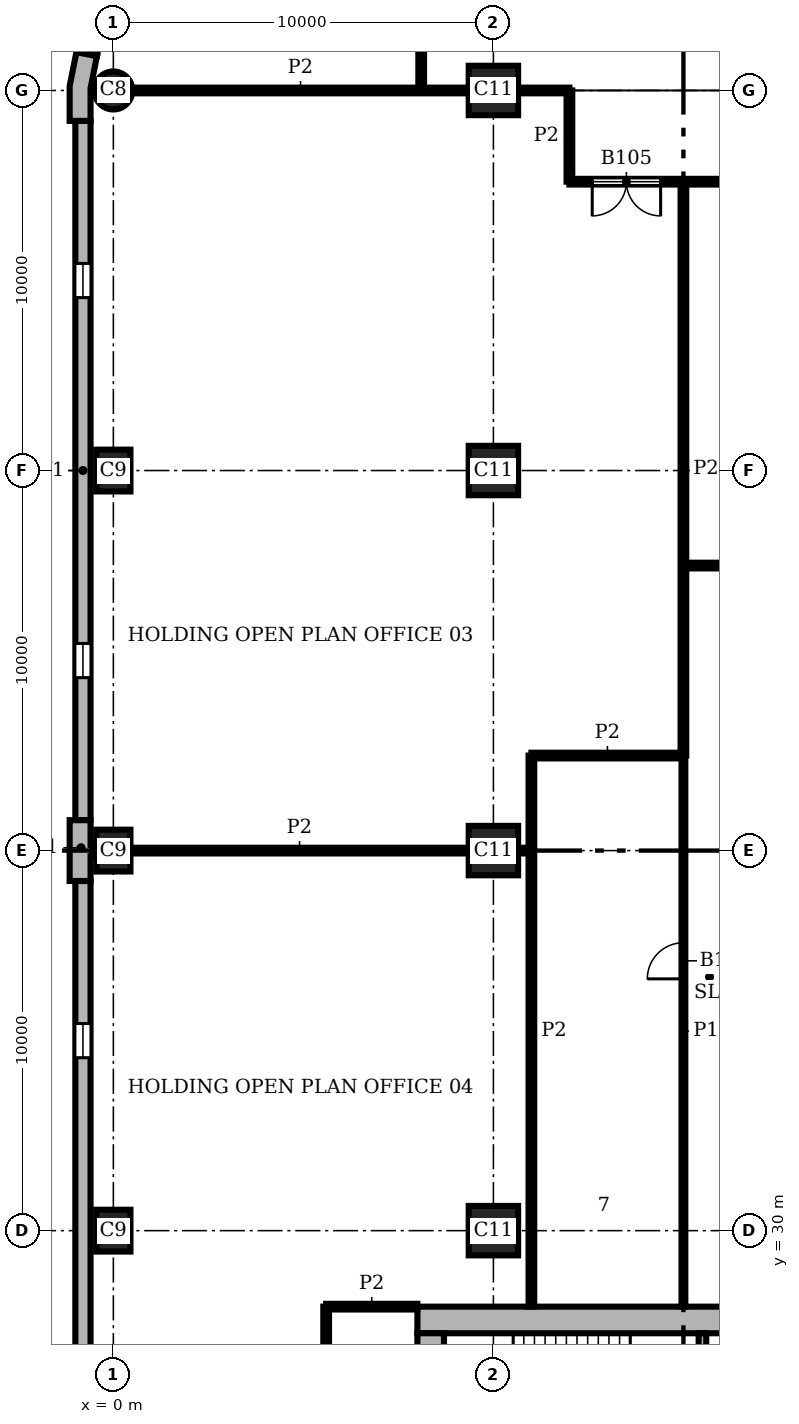
"""IFC4 building model, lengths in metres.
Left out: names, types, materials, properties, quantities, classifications, styles, units other than length and angle.
Written with IfcOpenShell. Run it as: python <this file> out.ifc"""

import sys

from ifc_helpers import new_model, si_unit, direction, frame, frame_2d, origin, origin_2d, place, context, subcontext, project, spatial, polyline, rectangle, circle, outline, extrude, element, fill, save


model = new_model("IFC4")
c1 = context("Model", 3, precision=1e-05, world=origin(), true_north=direction((0.0, 1.0)))
c2 = subcontext(c1, "Body", "Model", "MODEL_VIEW")
j1 = project(units=[si_unit("LENGTHUNIT", "METRE"), si_unit("PLANEANGLEUNIT", "RADIAN")], contexts=[c1])
p1 = place(None, origin())
s1 = spatial("IfcSite", under=j1, at=p1, CompositionType="ELEMENT")
p2 = place(p1, origin())
s2 = spatial("IfcBuilding", under=s1, at=p2, CompositionType="ELEMENT")
p3 = place(p2, frame((0.0, 0.0, 131.7)))
s3 = spatial("IfcBuildingStorey", under=s2, at=p3, CompositionType="ELEMENT", Elevation=131.7)
p4 = place(p3, frame((0.0, 60.0, 0.0), z_axis=(0.0, 0.0, 1.0), x_axis=(1.0, 0.0, 0.0)))
e1 = element("IfcColumn", 1, at=p4, inside=s3, PredefinedType="COLUMN", context=c2, shape_type="SweptSolid", body=[
    extrude(circle(Radius=0.5, at=origin_2d()), origin(), (0.0, 0.0, 1.0), 3.9),
])
for number, where, z_axis, x_axis in (
    (2, (0.0, 50.0, 0.0), (0.0, 0.0, 1.0), (0.0, 1.0, 0.0)),
    (3, (0.0, 40.0, 0.0), (0.0, 0.0, 1.0), (0.0, 1.0, 0.0)),
    (4, (0.0, 30.0, 0.0), (0.0, 0.0, 1.0), (0.0, 1.0, 0.0)),
):
    element("IfcColumn", number, at=place(p3, frame(where, z_axis=z_axis, x_axis=x_axis)), inside=s3, PredefinedType="COLUMN", context=c2, shape_type="SweptSolid", body=[
        extrude(rectangle(XDim=1.1, YDim=0.9, at=origin_2d()), origin(), (0.0, 0.0, 1.0), 3.9),
    ])
for number, where, z_axis, x_axis in (
    (5, (10.0, 30.0, 0.0), (0.0, 0.0, 1.0), (1.0, 0.0, 0.0)),
    (6, (10.0, 40.0, 0.0), (0.0, 0.0, 1.0), (1.0, 0.0, 0.0)),
    (7, (10.0, 50.0, 0.0), (0.0, 0.0, 1.0), (1.0, 0.0, 0.0)),
    (8, (10.0, 60.0, 0.0), (0.0, 0.0, 1.0), (1.0, 0.0, 0.0)),
):
    element("IfcColumn", number, at=place(p3, frame(where, z_axis=z_axis, x_axis=x_axis)), inside=s3, PredefinedType="COLUMN", context=c2, shape_type="SweptSolid", body=[
        extrude(rectangle(XDim=1.3, YDim=1.3, at=origin_2d()), origin(), (0.0, 0.0, 1.0), 3.9),
    ])
p5 = place(p3, frame((28.0, 27.65, 0.0), z_axis=(0.0, 0.0, 1.0), x_axis=(-1.0, 0.0, 0.0)))
e9 = element("IfcWall", 9, at=p5, inside=s3, PredefinedType="SHEAR", context=c2, shape_type="SweptSolid", body=[
    extrude(rectangle(XDim=20.0, YDim=0.7, at=frame_2d((10.0, 0.0))), origin(), (0.0, 0.0, 1.0), 3.9),
])
p6 = place(p3, frame((8.35, 27.3, 0.0), z_axis=(0.0, 0.0, 1.0), x_axis=(0.0, -1.0, 0.0)))
e10 = element("IfcWall", 10, at=p6, inside=s3, PredefinedType="SHEAR", context=c2, shape_type="SweptSolid", body=[
    extrude(rectangle(XDim=18.6, YDim=0.7, at=frame_2d((9.3, 0.0))), origin(), (0.0, 0.0, 1.0), 3.9),
])
p7 = place(p3, origin())
e11 = element("IfcWall", 11, at=p7, inside=s3, PredefinedType="SOLIDWALL", context=c2, shape_type="SweptSolid", body=[
    extrude(outline(polyline([(-0.825, 60.98), (-0.972, 61.009), (-1.15, 60.113), (-1.15, 59.2), (-1.0, 59.2), (-0.6, 59.2), (-0.6, 60.059), (-0.432, 60.902), (-0.825, 60.98)])), origin(), (0.0, 0.0, 1.0), 3.9),
])
e12 = element("IfcWall", 12, at=p7, inside=s3, PredefinedType="SOLIDWALL", context=c2, shape_type="SweptSolid", body=[
    extrude(outline(polyline([(-0.6, 39.2), (-0.6, 39.85), (-0.55, 39.85), (-0.55, 40.15), (-0.6, 40.15), (-0.6, 40.8), (-1.0, 40.8), (-1.15, 40.8), (-1.15, 40.0), (-1.15, 39.2), (-1.0, 39.2), (-0.6, 39.2)])), origin(), (0.0, 0.0, 1.0), 3.9),
])
p8 = place(p3, frame((0.299, 65.602, 0.0), z_axis=(0.0, 0.0, 1.0), x_axis=(-0.195098533057, -0.98078364709, 0.0)))
e13 = element("IfcWall", 13, at=p8, inside=s3, PredefinedType="SOLIDWALL", context=c2, shape_type="SweptSolid", body=[
    extrude(rectangle(XDim=4.753, YDim=0.4, at=frame_2d((2.376, 0.0))), origin(), (0.0, 0.0, 1.0), 3.9),
])
p9 = place(p8, frame((0.226, 0.0, 0.9)))
e14 = element("IfcOpeningElement", 14, at=p9, cuts=e13, PredefinedType="OPENING", context=c2, shape_type="SweptSolid", body=[
    extrude(rectangle(XDim=4.3, YDim=2.35, at=frame_2d((2.15, 1.175))), frame((0.0, 0.21, 0.0), z_axis=(0.0, -1.0, 0.0), x_axis=(1.0, 0.0, 0.0)), (0.0, 0.0, 1.0), 0.42),
])
p10 = place(p3, frame((-0.8, 59.2, 0.0), z_axis=(0.0, 0.0, 1.0), x_axis=(0.0, -1.0, 0.0)))
e15 = element("IfcWall", 15, at=p10, inside=s3, PredefinedType="SOLIDWALL", context=c2, shape_type="SweptSolid", body=[
    extrude(rectangle(XDim=18.4, YDim=0.4, at=frame_2d((9.2, 0.0))), origin(), (0.0, 0.0, 1.0), 3.9),
])
p11 = place(p10, frame((3.75, 0.0, 0.9)))
e16 = element("IfcOpeningElement", 16, at=p11, cuts=e15, PredefinedType="OPENING", context=c2, shape_type="SweptSolid", body=[
    extrude(rectangle(XDim=0.9, YDim=2.35, at=frame_2d((0.45, 1.175))), frame((0.0, 0.21, 0.0), z_axis=(0.0, -1.0, 0.0), x_axis=(1.0, 0.0, 0.0)), (0.0, 0.0, 1.0), 0.42),
])
p12 = place(p10, frame((13.75, 0.0, 0.9)))
e17 = element("IfcOpeningElement", 17, at=p12, cuts=e15, PredefinedType="OPENING", context=c2, shape_type="SweptSolid", body=[
    extrude(rectangle(XDim=0.9, YDim=2.35, at=frame_2d((0.45, 1.175))), frame((0.0, 0.21, 0.0), z_axis=(0.0, -1.0, 0.0), x_axis=(1.0, 0.0, 0.0)), (0.0, 0.0, 1.0), 0.42),
])
p13 = place(p3, frame((-0.8, 39.2, 0.0), z_axis=(0.0, 0.0, 1.0), x_axis=(0.0, -1.0, 0.0)))
e18 = element("IfcWall", 18, at=p13, inside=s3, PredefinedType="SOLIDWALL", context=c2, shape_type="SweptSolid", body=[
    extrude(rectangle(XDim=18.4, YDim=0.4, at=frame_2d((9.2, 0.0))), origin(), (0.0, 0.0, 1.0), 3.9),
])
p14 = place(p13, frame((3.75, 0.0, 0.9)))
e19 = element("IfcOpeningElement", 19, at=p14, cuts=e18, PredefinedType="OPENING", context=c2, shape_type="SweptSolid", body=[
    extrude(rectangle(XDim=0.9, YDim=2.35, at=frame_2d((0.45, 1.175))), frame((0.0, 0.21, 0.0), z_axis=(0.0, -1.0, 0.0), x_axis=(1.0, 0.0, 0.0)), (0.0, 0.0, 1.0), 0.42),
])
p15 = place(p13, frame((13.75, 0.0, 0.9)))
e20 = element("IfcOpeningElement", 20, at=p15, cuts=e18, PredefinedType="OPENING", context=c2, shape_type="SweptSolid", body=[
    extrude(rectangle(XDim=0.9, YDim=2.35, at=frame_2d((0.45, 1.175))), frame((0.0, 0.21, 0.0), z_axis=(0.0, -1.0, 0.0), x_axis=(1.0, 0.0, 0.0)), (0.0, 0.0, 1.0), 0.42),
])
p16 = place(p3, frame((15.5, 23.6, 0.0), z_axis=(0.0, 0.0, 1.0), x_axis=(0.0, 1.0, 0.0)))
e21 = element("IfcWall", 21, at=p16, inside=s3, PredefinedType="SHEAR", context=c2, shape_type="SweptSolid", body=[
    extrude(rectangle(XDim=3.7, YDim=0.2, at=frame_2d((1.85, 0.0))), origin(), (0.0, 0.0, 1.0), 3.58),
])
p17 = place(p3, frame((15.0, 28.0, 0.0), z_axis=(0.0, 0.0, 1.0), x_axis=(0.0, 1.0, 0.0)))
e22 = element("IfcWall", 22, at=p17, inside=s3, PredefinedType="PARTITIONING", context=c2, shape_type="SweptSolid", body=[
    extrude(rectangle(XDim=14.5, YDim=0.1, at=frame_2d((7.25, 0.0))), origin(), (0.0, 0.0, 1.0), 3.58),
])
p18 = place(p17, frame((8.625, 0.0, 0.0)))
e23 = element("IfcOpeningElement", 23, at=p18, cuts=e22, PredefinedType="OPENING", context=c2, shape_type="SweptSolid", body=[
    extrude(rectangle(XDim=0.95, YDim=2.1, at=frame_2d((0.475, 1.05))), frame((0.0, 0.06, 0.0), z_axis=(0.0, -1.0, 0.0), x_axis=(1.0, 0.0, 0.0)), (0.0, 0.0, 1.0), 0.12),
])
p19 = place(p3, frame((5.6, 5.6, 0.0), z_axis=(0.0, 0.0, 1.0), x_axis=(0.0, 1.0, 0.0)))
e24 = element("IfcWall", 24, at=p19, inside=s3, PredefinedType="PARTITIONING", context=c2, shape_type="SweptSolid", body=[
    extrude(rectangle(XDim=22.4, YDim=0.15, at=frame_2d((11.2, 0.0))), origin(), (0.0, 0.0, 1.0), 3.58),
])
p20 = place(p19, frame((3.85, 0.0, 0.0)))
e25 = element("IfcOpeningElement", 25, at=p20, cuts=e24, PredefinedType="OPENING", context=c2, shape_type="SweptSolid", body=[
    extrude(rectangle(XDim=1.0, YDim=2.1, at=frame_2d((0.5, 1.05))), frame((0.0, 0.085, 0.0), z_axis=(0.0, -1.0, 0.0), x_axis=(1.0, 0.0, 0.0)), (0.0, 0.0, 1.0), 0.17),
])
p21 = place(p19, frame((11.5, 0.0, 0.0)))
e26 = element("IfcOpeningElement", 26, at=p21, cuts=e24, PredefinedType="OPENING", context=c2, shape_type="SweptSolid", body=[
    extrude(rectangle(XDim=1.0, YDim=2.1, at=frame_2d((0.5, 1.05))), frame((0.0, 0.085, 0.0), z_axis=(0.0, -1.0, 0.0), x_axis=(1.0, 0.0, 0.0)), (0.0, 0.0, 1.0), 0.17),
])
p22 = place(p19, frame((16.75, 0.0, 0.0)))
e27 = element("IfcOpeningElement", 27, at=p22, cuts=e24, PredefinedType="OPENING", context=c2, shape_type="SweptSolid", body=[
    extrude(rectangle(XDim=1.8, YDim=2.1, at=frame_2d((0.9, 1.05))), frame((0.0, 0.085, 0.0), z_axis=(0.0, -1.0, 0.0), x_axis=(1.0, 0.0, 0.0)), (0.0, 0.0, 1.0), 0.17),
])
p23 = place(p3, frame((8.1, 60.0, 0.0), z_axis=(0.0, 0.0, 1.0), x_axis=(0.0, 1.0, 0.0)))
e28 = element("IfcWall", 28, at=p23, inside=s3, PredefinedType="PARTITIONING", context=c2, shape_type="SweptSolid", body=[
    extrude(rectangle(XDim=6.4, YDim=0.15, at=frame_2d((3.2, 0.0))), origin(), (0.0, 0.0, 1.0), 3.58),
])
p24 = place(p23, frame((2.85, 0.0, 0.0)))
e29 = element("IfcOpeningElement", 29, at=p24, cuts=e28, PredefinedType="OPENING", context=c2, shape_type="SweptSolid", body=[
    extrude(rectangle(XDim=1.8, YDim=2.1, at=frame_2d((0.9, 1.05))), frame((0.0, 0.085, 0.0), z_axis=(0.0, -1.0, 0.0), x_axis=(1.0, 0.0, 0.0)), (0.0, 0.0, 1.0), 0.17),
])
p25 = place(p3, frame((11.0, 28.0, 0.0), z_axis=(0.0, 0.0, 1.0), x_axis=(0.0, 1.0, 0.0)))
e30 = element("IfcWall", 30, at=p25, inside=s3, PredefinedType="PARTITIONING", context=c2, shape_type="SweptSolid", body=[
    extrude(rectangle(XDim=14.5, YDim=0.15, at=frame_2d((7.25, 0.0))), origin(), (0.0, 0.0, 1.0), 3.58),
])
p26 = place(p3, frame((12.0, 57.6, 0.0), z_axis=(0.0, 0.0, 1.0), x_axis=(0.0, 1.0, 0.0)))
e31 = element("IfcWall", 31, at=p26, inside=s3, PredefinedType="PARTITIONING", context=c2, shape_type="SweptSolid", body=[
    extrude(rectangle(XDim=2.4, YDim=0.15, at=frame_2d((1.2, 0.0))), origin(), (0.0, 0.0, 1.0), 3.58),
])
p27 = place(p3, frame((15.0, 42.5, 0.0), z_axis=(0.0, 0.0, 1.0), x_axis=(0.0, 1.0, 0.0)))
e32 = element("IfcWall", 32, at=p27, inside=s3, PredefinedType="PARTITIONING", context=c2, shape_type="SweptSolid", body=[
    extrude(rectangle(XDim=15.1, YDim=0.15, at=frame_2d((7.55, 0.0))), origin(), (0.0, 0.0, 1.0), 3.58),
])
p28 = place(p3, frame((5.6, 28.0, 0.0), z_axis=(0.0, 0.0, 1.0), x_axis=(1.0, 0.0, 0.0)))
e33 = element("IfcWall", 33, at=p28, inside=s3, PredefinedType="PARTITIONING", context=c2, shape_type="SweptSolid", body=[
    extrude(rectangle(XDim=2.4, YDim=0.15, at=frame_2d((1.2, 0.0))), origin(), (0.0, 0.0, 1.0), 3.58),
])
p29 = place(p3, frame((0.45, 40.0, 0.0), z_axis=(0.0, 0.0, 1.0), x_axis=(1.0, 0.0, 0.0)))
e34 = element("IfcWall", 34, at=p29, inside=s3, PredefinedType="PARTITIONING", context=c2, shape_type="SweptSolid", body=[
    extrude(rectangle(XDim=8.9, YDim=0.15, at=frame_2d((4.45, 0.0))), origin(), (0.0, 0.0, 1.0), 3.58),
])
p30 = place(p3, frame((10.65, 40.0, 0.0), z_axis=(0.0, 0.0, 1.0), x_axis=(1.0, 0.0, 0.0)))
e35 = element("IfcWall", 35, at=p30, inside=s3, PredefinedType="PARTITIONING", context=c2, shape_type="SweptSolid", body=[
    extrude(rectangle(XDim=0.35, YDim=0.15, at=frame_2d((0.175, 0.0))), origin(), (0.0, 0.0, 1.0), 3.58),
])
p31 = place(p3, frame((11.0, 42.5, 0.0), z_axis=(0.0, 0.0, 1.0), x_axis=(1.0, 0.0, 0.0)))
e36 = element("IfcWall", 36, at=p31, inside=s3, PredefinedType="PARTITIONING", context=c2, shape_type="SweptSolid", body=[
    extrude(rectangle(XDim=4.0, YDim=0.15, at=frame_2d((2.0, 0.0))), origin(), (0.0, 0.0, 1.0), 3.58),
])
p32 = place(p3, frame((15.0, 47.5, 0.0), z_axis=(0.0, 0.0, 1.0), x_axis=(1.0, 0.0, 0.0)))
e37 = element("IfcWall", 37, at=p32, inside=s3, PredefinedType="PARTITIONING", context=c2, shape_type="SweptSolid", body=[
    extrude(rectangle(XDim=11.0, YDim=0.15, at=frame_2d((5.5, 0.0))), origin(), (0.0, 0.0, 1.0), 3.58),
])
p33 = place(p3, frame((12.0, 57.6, 0.0), z_axis=(0.0, 0.0, 1.0), x_axis=(1.0, 0.0, 0.0)))
e38 = element("IfcWall", 38, at=p33, inside=s3, PredefinedType="PARTITIONING", context=c2, shape_type="SweptSolid", body=[
    extrude(rectangle(XDim=14.0, YDim=0.15, at=frame_2d((7.0, 0.0))), origin(), (0.0, 0.0, 1.0), 3.58),
])
p34 = place(p33, frame((9.1, 0.0, 0.0)))
e39 = element("IfcOpeningElement", 39, at=p34, cuts=e38, PredefinedType="OPENING", context=c2, shape_type="SweptSolid", body=[
    extrude(rectangle(XDim=1.0, YDim=2.1, at=frame_2d((0.5, 1.05))), frame((0.0, 0.085, 0.0), z_axis=(0.0, -1.0, 0.0), x_axis=(1.0, 0.0, 0.0)), (0.0, 0.0, 1.0), 0.17),
])
p35 = place(p33, frame((0.6, 0.0, 0.0)))
e40 = element("IfcOpeningElement", 40, at=p35, cuts=e38, PredefinedType="OPENING", context=c2, shape_type="SweptSolid", body=[
    extrude(rectangle(XDim=1.8, YDim=2.1, at=frame_2d((0.9, 1.05))), frame((0.0, 0.085, 0.0), z_axis=(0.0, -1.0, 0.0), x_axis=(1.0, 0.0, 0.0)), (0.0, 0.0, 1.0), 0.17),
])
p36 = place(p3, frame((0.5, 60.0, 0.0), z_axis=(0.0, 0.0, 1.0), x_axis=(1.0, 0.0, 0.0)))
e41 = element("IfcWall", 41, at=p36, inside=s3, PredefinedType="PARTITIONING", context=c2, shape_type="SweptSolid", body=[
    extrude(rectangle(XDim=8.85, YDim=0.15, at=frame_2d((4.425, 0.0))), origin(), (0.0, 0.0, 1.0), 3.58),
])
p37 = place(p3, frame((10.65, 60.0, 0.0), z_axis=(0.0, 0.0, 1.0), x_axis=(1.0, 0.0, 0.0)))
e42 = element("IfcWall", 42, at=p37, inside=s3, PredefinedType="PARTITIONING", context=c2, shape_type="SweptSolid", body=[
    extrude(rectangle(XDim=1.35, YDim=0.15, at=frame_2d((0.675, 0.0))), origin(), (0.0, 0.0, 1.0), 3.58),
])
p38 = place(p11, origin())
e43 = element("IfcWindow", 43, at=p38, inside=s3, PartitioningType="SINGLE_PANEL", PredefinedType="WINDOW", context=c2, shape_type="SweptSolid", body=[
    extrude(rectangle(XDim=0.9, YDim=2.35, at=frame_2d((0.45, 1.175))), frame((0.0, 0.16, 0.0), z_axis=(0.0, -1.0, 0.0), x_axis=(1.0, 0.0, 0.0)), (0.0, 0.0, 1.0), 0.06),
])
fill(e16, e43)
p39 = place(p12, origin())
e44 = element("IfcWindow", 44, at=p39, inside=s3, PartitioningType="SINGLE_PANEL", PredefinedType="WINDOW", context=c2, shape_type="SweptSolid", body=[
    extrude(rectangle(XDim=0.9, YDim=2.35, at=frame_2d((0.45, 1.175))), frame((0.0, 0.16, 0.0), z_axis=(0.0, -1.0, 0.0), x_axis=(1.0, 0.0, 0.0)), (0.0, 0.0, 1.0), 0.06),
])
fill(e17, e44)
p40 = place(p14, origin())
e45 = element("IfcWindow", 45, at=p40, inside=s3, PartitioningType="SINGLE_PANEL", PredefinedType="WINDOW", context=c2, shape_type="SweptSolid", body=[
    extrude(rectangle(XDim=0.9, YDim=2.35, at=frame_2d((0.45, 1.175))), frame((0.0, 0.16, 0.0), z_axis=(0.0, -1.0, 0.0), x_axis=(1.0, 0.0, 0.0)), (0.0, 0.0, 1.0), 0.06),
])
fill(e19, e45)
p41 = place(p35, frame((1.8, 0.0, 0.0), z_axis=(0.0, 0.0, 1.0), x_axis=(-1.0, 0.0, 0.0)))
e46 = element("IfcDoor", 46, at=p41, inside=s3, OperationType="DOUBLE_DOOR_SINGLE_SWING", PredefinedType="DOOR", context=c2, shape_type="SweptSolid", body=[
    extrude(rectangle(XDim=1.8, YDim=2.1, at=frame_2d((0.9, 1.05))), frame((0.0, 0.025, 0.0), z_axis=(0.0, -1.0, 0.0), x_axis=(1.0, 0.0, 0.0)), (0.0, 0.0, 1.0), 0.05),
])
fill(e40, e46)
p42 = place(p18, origin())
e47 = element("IfcDoor", 47, at=p42, inside=s3, OperationType="SINGLE_SWING_LEFT", PredefinedType="DOOR", context=c2, shape_type="SweptSolid", body=[
    extrude(rectangle(XDim=0.95, YDim=2.1, at=frame_2d((0.475, 1.05))), frame((0.0, 0.025, 0.0), z_axis=(0.0, -1.0, 0.0), x_axis=(1.0, 0.0, 0.0)), (0.0, 0.0, 1.0), 0.05),
])
fill(e23, e47)
save(model, sys.argv[1])
